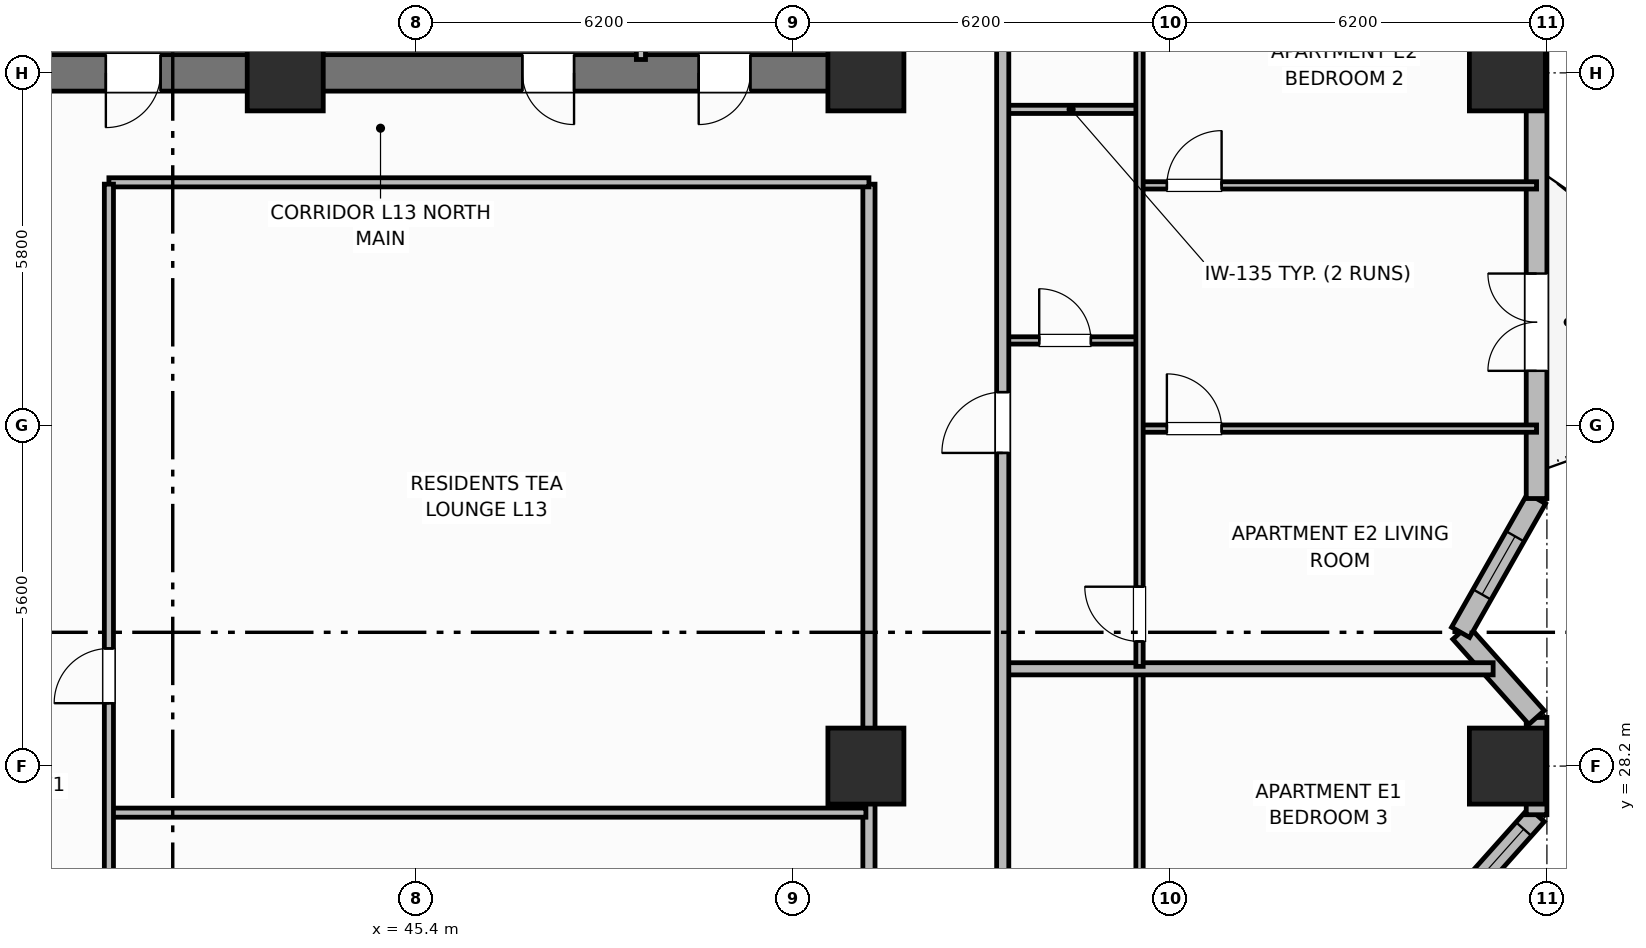
"""IFC4 building model, lengths in metres.
Left out: names, types, materials, properties, quantities, classifications, styles, units other than length and angle.
Written with IfcOpenShell. Run it as: python <this file> out.ifc"""

import sys

from ifc_helpers import new_model, si_unit, direction, frame, frame_2d, origin, origin_2d, place, context, subcontext, project, spatial, rectangle, extrude, element, fill, save


model = new_model("IFC4")
c1 = context("Model", 3, precision=1e-05, world=origin(), true_north=direction((0.0, 1.0)))
c2 = subcontext(c1, "Body", "Model", "MODEL_VIEW")
j1 = project(units=[si_unit("LENGTHUNIT", "METRE"), si_unit("PLANEANGLEUNIT", "RADIAN")], contexts=[c1])
p1 = place(None, origin())
s1 = spatial("IfcSite", under=j1, at=p1, CompositionType="ELEMENT")
p2 = place(p1, origin())
s2 = spatial("IfcBuilding", under=s1, at=p2, CompositionType="ELEMENT")
p3 = place(p2, frame((0.0, 0.0, 54.7)))
s3 = spatial("IfcBuildingStorey", under=s2, at=p3, CompositionType="ELEMENT", Elevation=54.7)
p4 = place(p3, frame((52.8, 39.9, 0.0), z_axis=(0.0, 0.0, 1.0), x_axis=(0.0, 1.0, 0.0)))
e1 = element("IfcWall", 1, at=p4, inside=s3, PredefinedType="SHEAR", context=c2, shape_type="SweptSolid", body=[
    extrude(rectangle(XDim=5.6, YDim=0.6, at=frame_2d((2.8, 0.0))), origin(), (0.0, 0.0, 1.0), 3.7),
])
p5 = place(p3, frame((52.8, 39.6, 0.0), z_axis=(0.0, 0.0, 1.0), x_axis=(-1.0, 0.0, 0.0)))
e2 = element("IfcWall", 2, at=p5, inside=s3, PredefinedType="SHEAR", context=c2, shape_type="SweptSolid", body=[
    extrude(rectangle(XDim=27.2, YDim=0.6, at=frame_2d((13.6, 0.0))), origin(), (0.0, 0.0, 1.0), 3.7),
])
p6 = place(p5, frame((24.2, 0.0, 0.0)))
e3 = element("IfcOpeningElement", 3, at=p6, cuts=e2, PredefinedType="OPENING", context=c2, shape_type="SweptSolid", body=[
    extrude(rectangle(XDim=1.1, YDim=2.15, at=frame_2d((0.55, 1.075))), frame((0.0, 0.31, 0.0), z_axis=(0.0, -1.0, 0.0), x_axis=(1.0, 0.0, 0.0)), (0.0, 0.0, 1.0), 0.62),
])
p7 = place(p5, frame((20.55, 0.0, 0.0)))
e4 = element("IfcOpeningElement", 4, at=p7, cuts=e2, PredefinedType="OPENING", context=c2, shape_type="SweptSolid", body=[
    extrude(rectangle(XDim=0.95, YDim=2.1, at=frame_2d((0.475, 1.05))), frame((0.0, 0.31, 0.0), z_axis=(0.0, -1.0, 0.0), x_axis=(1.0, 0.0, 0.0)), (0.0, 0.0, 1.0), 0.62),
])
p8 = place(p5, frame((15.1, 0.0, 0.0)))
e5 = element("IfcOpeningElement", 5, at=p8, cuts=e2, PredefinedType="OPENING", context=c2, shape_type="SweptSolid", body=[
    extrude(rectangle(XDim=1.2, YDim=2.15, at=frame_2d((0.6, 1.075))), frame((0.0, 0.31, 0.0), z_axis=(0.0, -1.0, 0.0), x_axis=(1.0, 0.0, 0.0)), (0.0, 0.0, 1.0), 0.62),
])
p9 = place(p5, frame((11.6, 0.0, 0.0)))
e6 = element("IfcOpeningElement", 6, at=p9, cuts=e2, PredefinedType="OPENING", context=c2, shape_type="SweptSolid", body=[
    extrude(rectangle(XDim=0.9, YDim=2.1, at=frame_2d((0.45, 1.05))), frame((0.0, 0.31, 0.0), z_axis=(0.0, -1.0, 0.0), x_axis=(1.0, 0.0, 0.0)), (0.0, 0.0, 1.0), 0.62),
])
p10 = place(p5, frame((4.8, 0.0, 0.0)))
e7 = element("IfcOpeningElement", 7, at=p10, cuts=e2, PredefinedType="OPENING", context=c2, shape_type="SweptSolid", body=[
    extrude(rectangle(XDim=0.85, YDim=2.1, at=frame_2d((0.425, 1.05))), frame((0.0, 0.31, 0.0), z_axis=(0.0, -1.0, 0.0), x_axis=(1.0, 0.0, 0.0)), (0.0, 0.0, 1.0), 0.62),
])
p11 = place(p5, frame((1.9, 0.0, 0.0)))
e8 = element("IfcOpeningElement", 8, at=p11, cuts=e2, PredefinedType="OPENING", context=c2, shape_type="SweptSolid", body=[
    extrude(rectangle(XDim=0.85, YDim=2.1, at=frame_2d((0.425, 1.05))), frame((0.0, 0.31, 0.0), z_axis=(0.0, -1.0, 0.0), x_axis=(1.0, 0.0, 0.0)), (0.0, 0.0, 1.0), 0.62),
])
p12 = place(p3, frame((43.25, 39.9, 0.0), z_axis=(0.0, 0.0, 1.0), x_axis=(0.0, 1.0, 0.0)))
e9 = element("IfcWall", 9, at=p12, inside=s3, PredefinedType="SHEAR", context=c2, shape_type="SweptSolid", body=[
    extrude(rectangle(XDim=5.6, YDim=0.4, at=frame_2d((2.8, 0.0))), origin(), (0.0, 0.0, 1.0), 3.7),
])
for number, where, z_axis, x_axis in (
    (10, (43.25, 39.6, 0.0), (0.0, 0.0, 1.0), (1.0, 0.0, 0.0)),
    (11, (52.8, 39.6, 0.0), (0.0, 0.0, 1.0), (1.0, 0.0, 0.0)),
    (12, (52.8, 28.2, 0.0), (0.0, 0.0, 1.0), (1.0, 0.0, 0.0)),
    (13, (63.35, 28.2, 0.0), (0.0, 0.0, 1.0), (1.0, 0.0, 0.0)),
    (14, (63.35, 39.6, 0.0), (0.0, 0.0, 1.0), (1.0, 0.0, 0.0)),
):
    element("IfcColumn", number, at=place(p3, frame(where, z_axis=z_axis, x_axis=x_axis)), inside=s3, PredefinedType="COLUMN", context=c2, shape_type="SweptSolid", body=[
        extrude(rectangle(XDim=1.25, YDim=1.25, at=origin_2d()), origin(), (0.0, 0.0, 1.0), 3.7),
    ])
p13 = place(p3, frame((62.58, 26.0, 0.0), z_axis=(0.0, 0.0, 1.0), x_axis=(0.666041619974, 0.74591457987, 0.0)))
e15 = element("IfcWall", 15, at=p13, inside=s3, PredefinedType="SOLIDWALL", context=c2, shape_type="SweptSolid", body=[
    extrude(rectangle(XDim=1.877, YDim=0.34, at=frame_2d((0.938, 0.0))), origin(), (0.0, 0.0, 1.0), 2.7),
])
p14 = place(p13, frame((0.16, 0.0, 0.69)))
e16 = element("IfcOpeningElement", 16, at=p14, cuts=e15, PredefinedType="OPENING", context=c2, shape_type="SweptSolid", body=[
    extrude(rectangle(XDim=1.4, YDim=1.85, at=frame_2d((0.7, 0.925))), frame((0.0, 0.18, 0.0), z_axis=(0.0, -1.0, 0.0), x_axis=(1.0, 0.0, 0.0)), (0.0, 0.0, 1.0), 0.36),
])
p15 = place(p3, frame((63.83, 27.4, 0.0), z_axis=(0.0, 0.0, 1.0), x_axis=(0.0, 1.0, 0.0)))
e17 = element("IfcWall", 17, at=p15, inside=s3, PredefinedType="SOLIDWALL", context=c2, shape_type="SweptSolid", body=[
    extrude(rectangle(XDim=1.6, YDim=0.34, at=frame_2d((0.8, 0.0))), origin(), (0.0, 0.0, 1.0), 2.7),
])
p16 = place(p3, frame((63.83, 29.0, 0.0), z_axis=(0.0, 0.0, 1.0), x_axis=(-0.666041619974, 0.74591457987, 0.0)))
e18 = element("IfcWall", 18, at=p16, inside=s3, PredefinedType="SOLIDWALL", context=c2, shape_type="SweptSolid", body=[
    extrude(rectangle(XDim=1.877, YDim=0.34, at=frame_2d((0.938, 0.0))), origin(), (0.0, 0.0, 1.0), 2.7),
])
p17 = place(p3, frame((62.58, 30.4, 0.0), z_axis=(0.0, 0.0, 1.0), x_axis=(0.493976255291, 0.869475393101, 0.0)))
e19 = element("IfcWall", 19, at=p17, inside=s3, PredefinedType="SOLIDWALL", context=c2, shape_type="SweptSolid", body=[
    extrude(rectangle(XDim=2.531, YDim=0.34, at=frame_2d((1.265, 0.0))), origin(), (0.0, 0.0, 1.0), 2.7),
])
p18 = place(p17, frame((0.715, 0.0, 0.89)))
e20 = element("IfcOpeningElement", 20, at=p18, cuts=e19, PredefinedType="OPENING", context=c2, shape_type="SweptSolid", body=[
    extrude(rectangle(XDim=1.1, YDim=1.65, at=frame_2d((0.55, 0.825))), frame((0.0, 0.18, 0.0), z_axis=(0.0, -1.0, 0.0), x_axis=(1.0, 0.0, 0.0)), (0.0, 0.0, 1.0), 0.36),
])
p19 = place(p3, frame((63.83, 32.6, 0.0), z_axis=(0.0, 0.0, 1.0), x_axis=(0.0, 1.0, 0.0)))
e21 = element("IfcWall", 21, at=p19, inside=s3, PredefinedType="SOLIDWALL", context=c2, shape_type="SweptSolid", body=[
    extrude(rectangle(XDim=14.8, YDim=0.34, at=frame_2d((7.4, 0.0))), origin(), (0.0, 0.0, 1.0), 2.7),
])
p20 = place(p19, frame((2.1, 0.0, 0.0)))
e22 = element("IfcOpeningElement", 22, at=p20, cuts=e21, PredefinedType="OPENING", context=c2, shape_type="SweptSolid", body=[
    extrude(rectangle(XDim=1.6, YDim=2.1, at=frame_2d((0.8, 1.05))), frame((0.0, 0.18, 0.0), z_axis=(0.0, -1.0, 0.0), x_axis=(1.0, 0.0, 0.0)), (0.0, 0.0, 1.0), 0.36),
])
p21 = place(p19, frame((7.68, 0.0, 0.89)))
e23 = element("IfcOpeningElement", 23, at=p21, cuts=e21, PredefinedType="OPENING", context=c2, shape_type="SweptSolid", body=[
    extrude(rectangle(XDim=1.1, YDim=1.65, at=frame_2d((0.55, 0.825))), frame((0.0, 0.18, 0.0), z_axis=(0.0, -1.0, 0.0), x_axis=(1.0, 0.0, 0.0)), (0.0, 0.0, 1.0), 0.36),
])
p22 = place(p19, frame((9.95, 0.0, 0.73)))
e24 = element("IfcOpeningElement", 24, at=p22, cuts=e21, PredefinedType="OPENING", context=c2, shape_type="SweptSolid", body=[
    extrude(rectangle(XDim=1.8, YDim=1.85, at=frame_2d((0.9, 0.925))), frame((0.0, 0.18, 0.0), z_axis=(0.0, -1.0, 0.0), x_axis=(1.0, 0.0, 0.0)), (0.0, 0.0, 1.0), 0.36),
])
p23 = place(p3, frame((49.1, 39.82, 0.0), z_axis=(0.0, 0.0, 1.0), x_axis=(0.0, 1.0, 0.0)))
e25 = element("IfcWall", 25, at=p23, inside=s3, PredefinedType="PARTITIONING", context=c2, shape_type="SweptSolid", body=[
    extrude(rectangle(XDim=2.73, YDim=0.15, at=frame_2d((1.365, 0.0))), origin(), (0.0, 0.0, 1.0), 2.53),
])
p24 = place(p3, frame((52.85, 18.63, 0.0), z_axis=(0.0, 0.0, 1.0), x_axis=(0.0, 1.0, 0.0)))
e26 = element("IfcWall", 26, at=p24, inside=s3, PredefinedType="PARTITIONING", context=c2, shape_type="SweptSolid", body=[
    extrude(rectangle(XDim=19.14, YDim=0.2, at=frame_2d((9.57, 0.0))), origin(), (0.0, 0.0, 1.0), 2.53),
])
p25 = place(p3, frame((40.35, 37.8, 0.0), z_axis=(0.0, 0.0, 1.0), x_axis=(1.0, 0.0, 0.0)))
e27 = element("IfcWall", 27, at=p25, inside=s3, PredefinedType="PARTITIONING", context=c2, shape_type="SweptSolid", body=[
    extrude(rectangle(XDim=12.5, YDim=0.15, at=frame_2d((6.25, 0.0))), origin(), (0.0, 0.0, 1.0), 2.53),
])
p26 = place(p3, frame((40.38, 27.434, 0.0), z_axis=(0.0, 0.0, 1.0), x_axis=(1.0, 0.0, 0.0)))
e28 = element("IfcWall", 28, at=p26, inside=s3, PredefinedType="PARTITIONING", context=c2, shape_type="SweptSolid", body=[
    extrude(rectangle(XDim=12.42, YDim=0.15, at=frame_2d((6.21, 0.0))), origin(), (0.0, 0.0, 1.0), 2.53),
])
p27 = place(p3, frame((40.35, 18.63, 0.0), z_axis=(0.0, 0.0, 1.0), x_axis=(0.0, 1.0, 0.0)))
e29 = element("IfcWall", 29, at=p27, inside=s3, PredefinedType="PARTITIONING", context=c2, shape_type="SweptSolid", body=[
    extrude(rectangle(XDim=19.14, YDim=0.15, at=frame_2d((9.57, 0.0))), origin(), (0.0, 0.0, 1.0), 2.53),
])
p28 = place(p27, frame((2.2, 0.0, 0.0)))
e30 = element("IfcOpeningElement", 30, at=p28, cuts=e29, PredefinedType="OPENING", context=c2, shape_type="SweptSolid", body=[
    extrude(rectangle(XDim=1.0, YDim=2.15, at=frame_2d((0.5, 1.075))), frame((0.0, 0.085, 0.0), z_axis=(0.0, -1.0, 0.0), x_axis=(1.0, 0.0, 0.0)), (0.0, 0.0, 1.0), 0.17),
])
p29 = place(p27, frame((10.604, 0.0, 0.0)))
e31 = element("IfcOpeningElement", 31, at=p29, cuts=e29, PredefinedType="OPENING", context=c2, shape_type="SweptSolid", body=[
    extrude(rectangle(XDim=0.9, YDim=2.1, at=frame_2d((0.45, 1.05))), frame((0.0, 0.085, 0.0), z_axis=(0.0, -1.0, 0.0), x_axis=(1.0, 0.0, 0.0)), (0.0, 0.0, 1.0), 0.17),
])
p30 = place(p3, frame((57.3, 10.64, 0.0), z_axis=(0.0, 0.0, 1.0), x_axis=(0.0, 1.0, 0.0)))
e32 = element("IfcWall", 32, at=p30, inside=s3, PredefinedType="PARTITIONING", context=c2, shape_type="SweptSolid", body=[
    extrude(rectangle(XDim=19.12, YDim=0.12, at=frame_2d((9.56, 0.0))), origin(), (0.0, 0.0, 1.0), 2.53),
])
p31 = place(p30, frame((0.41, 0.0, 0.0)))
e33 = element("IfcOpeningElement", 33, at=p31, cuts=e32, PredefinedType="OPENING", context=c2, shape_type="SweptSolid", body=[
    extrude(rectangle(XDim=0.9, YDim=2.1, at=frame_2d((0.45, 1.05))), frame((0.0, 0.07, 0.0), z_axis=(0.0, -1.0, 0.0), x_axis=(1.0, 0.0, 0.0)), (0.0, 0.0, 1.0), 0.14),
])
p32 = place(p30, frame((12.105, 0.0, 0.0)))
e34 = element("IfcOpeningElement", 34, at=p32, cuts=e32, PredefinedType="OPENING", context=c2, shape_type="SweptSolid", body=[
    extrude(rectangle(XDim=0.82, YDim=2.08, at=frame_2d((0.41, 1.04))), frame((0.0, 0.07, 0.0), z_axis=(0.0, -1.0, 0.0), x_axis=(1.0, 0.0, 0.0)), (0.0, 0.0, 1.0), 0.14),
])
p33 = place(p3, frame((55.05, 29.8, 0.0), z_axis=(0.0, 0.0, 1.0), x_axis=(1.0, 0.0, 0.0)))
e35 = element("IfcWall", 35, at=p33, inside=s3, PredefinedType="PARTITIONING", context=c2, shape_type="SweptSolid", body=[
    extrude(rectangle(XDim=8.066, YDim=0.2, at=frame_2d((4.033, 0.0))), origin(), (0.0, 0.0, 1.0), 2.53),
])
p34 = place(p3, frame((55.05, 35.2, 0.0), z_axis=(0.0, 0.0, 1.0), x_axis=(1.0, 0.0, 0.0)))
e36 = element("IfcWall", 36, at=p34, inside=s3, PredefinedType="PARTITIONING", context=c2, shape_type="SweptSolid", body=[
    extrude(rectangle(XDim=2.25, YDim=0.12, at=frame_2d((1.125, 0.0))), origin(), (0.0, 0.0, 1.0), 2.53),
])
p35 = place(p34, frame((0.6, 0.0, 0.0)))
e37 = element("IfcOpeningElement", 37, at=p35, cuts=e36, PredefinedType="OPENING", context=c2, shape_type="SweptSolid", body=[
    extrude(rectangle(XDim=0.85, YDim=2.1, at=frame_2d((0.425, 1.05))), frame((0.0, 0.07, 0.0), z_axis=(0.0, -1.0, 0.0), x_axis=(1.0, 0.0, 0.0)), (0.0, 0.0, 1.0), 0.14),
])
p36 = place(p3, frame((55.05, 39.0, 0.0), z_axis=(0.0, 0.0, 1.0), x_axis=(1.0, 0.0, 0.0)))
e38 = element("IfcWall", 38, at=p36, inside=s3, PredefinedType="PARTITIONING", context=c2, shape_type="SweptSolid", body=[
    extrude(rectangle(XDim=2.25, YDim=0.135, at=frame_2d((1.125, 0.0))), origin(), (0.0, 0.0, 1.0), 2.53),
])
p37 = place(p3, frame((57.3, 33.75, 0.0), z_axis=(0.0, 0.0, 1.0), x_axis=(1.0, 0.0, 0.0)))
e39 = element("IfcWall", 39, at=p37, inside=s3, PredefinedType="PARTITIONING", context=c2, shape_type="SweptSolid", body=[
    extrude(rectangle(XDim=6.53, YDim=0.12, at=frame_2d((3.265, 0.0))), origin(), (0.0, 0.0, 1.0), 2.53),
])
p38 = place(p37, frame((0.45, 0.0, 0.0)))
e40 = element("IfcOpeningElement", 40, at=p38, cuts=e39, PredefinedType="OPENING", context=c2, shape_type="SweptSolid", body=[
    extrude(rectangle(XDim=0.9, YDim=2.1, at=frame_2d((0.45, 1.05))), frame((0.0, 0.07, 0.0), z_axis=(0.0, -1.0, 0.0), x_axis=(1.0, 0.0, 0.0)), (0.0, 0.0, 1.0), 0.14),
])
p39 = place(p3, frame((57.3, 37.75, 0.0), z_axis=(0.0, 0.0, 1.0), x_axis=(1.0, 0.0, 0.0)))
e41 = element("IfcWall", 41, at=p39, inside=s3, PredefinedType="PARTITIONING", context=c2, shape_type="SweptSolid", body=[
    extrude(rectangle(XDim=6.53, YDim=0.12, at=frame_2d((3.265, 0.0))), origin(), (0.0, 0.0, 1.0), 2.53),
])
p40 = place(p39, frame((0.45, 0.0, 0.0)))
e42 = element("IfcOpeningElement", 42, at=p40, cuts=e41, PredefinedType="OPENING", context=c2, shape_type="SweptSolid", body=[
    extrude(rectangle(XDim=0.9, YDim=2.1, at=frame_2d((0.45, 1.05))), frame((0.0, 0.07, 0.0), z_axis=(0.0, -1.0, 0.0), x_axis=(1.0, 0.0, 0.0)), (0.0, 0.0, 1.0), 0.14),
])
p41 = place(p3, frame((57.3, 29.84, 0.0), z_axis=(0.0, 0.0, 1.0), x_axis=(0.0, 1.0, 0.0)))
e43 = element("IfcWall", 43, at=p41, inside=s3, PredefinedType="PARTITIONING", context=c2, shape_type="SweptSolid", body=[
    extrude(rectangle(XDim=15.92, YDim=0.12, at=frame_2d((7.96, 0.0))), origin(), (0.0, 0.0, 1.0), 2.53),
])
p42 = place(p41, frame((0.41, 0.0, 0.0)))
e44 = element("IfcOpeningElement", 44, at=p42, cuts=e43, PredefinedType="OPENING", context=c2, shape_type="SweptSolid", body=[
    extrude(rectangle(XDim=0.9, YDim=2.1, at=frame_2d((0.45, 1.05))), frame((0.0, 0.07, 0.0), z_axis=(0.0, -1.0, 0.0), x_axis=(1.0, 0.0, 0.0)), (0.0, 0.0, 1.0), 0.14),
])
p43 = place(p41, frame((13.125, 0.0, 0.0)))
e45 = element("IfcOpeningElement", 45, at=p43, cuts=e43, PredefinedType="OPENING", context=c2, shape_type="SweptSolid", body=[
    extrude(rectangle(XDim=0.82, YDim=2.08, at=frame_2d((0.41, 1.04))), frame((0.0, 0.07, 0.0), z_axis=(0.0, -1.0, 0.0), x_axis=(1.0, 0.0, 0.0)), (0.0, 0.0, 1.0), 0.14),
])
p44 = place(p3, frame((55.05, 10.6, 0.0), z_axis=(0.0, 0.0, 1.0), x_axis=(0.0, 1.0, 0.0)))
e46 = element("IfcWall", 46, at=p44, inside=s3, PredefinedType="PARTITIONING", context=c2, shape_type="SweptSolid", body=[
    extrude(rectangle(XDim=35.2, YDim=0.2, at=frame_2d((17.6, 0.0))), origin(), (0.0, 0.0, 1.0), 2.53),
])
p45 = place(p44, frame((2.65, 0.0, 0.0)))
e47 = element("IfcOpeningElement", 47, at=p45, cuts=e46, PredefinedType="OPENING", context=c2, shape_type="SweptSolid", body=[
    extrude(rectangle(XDim=1.0, YDim=2.15, at=frame_2d((0.5, 1.075))), frame((0.0, 0.11, 0.0), z_axis=(0.0, -1.0, 0.0), x_axis=(1.0, 0.0, 0.0)), (0.0, 0.0, 1.0), 0.22),
])
p46 = place(p44, frame((22.75, 0.0, 0.0)))
e48 = element("IfcOpeningElement", 48, at=p46, cuts=e46, PredefinedType="OPENING", context=c2, shape_type="SweptSolid", body=[
    extrude(rectangle(XDim=1.0, YDim=2.15, at=frame_2d((0.5, 1.075))), frame((0.0, 0.11, 0.0), z_axis=(0.0, -1.0, 0.0), x_axis=(1.0, 0.0, 0.0)), (0.0, 0.0, 1.0), 0.22),
])
p47 = place(p14, origin())
e49 = element("IfcWindow", 49, at=p47, inside=s3, PartitioningType="SINGLE_PANEL", PredefinedType="WINDOW", context=c2, shape_type="SweptSolid", body=[
    extrude(rectangle(XDim=1.4, YDim=1.85, at=frame_2d((0.7, 0.925))), frame((0.0, 0.03, 0.0), z_axis=(0.0, -1.0, 0.0), x_axis=(1.0, 0.0, 0.0)), (0.0, 0.0, 1.0), 0.06),
])
fill(e16, e49)
p48 = place(p18, origin())
e50 = element("IfcWindow", 50, at=p48, inside=s3, PartitioningType="SINGLE_PANEL", PredefinedType="WINDOW", context=c2, shape_type="SweptSolid", body=[
    extrude(rectangle(XDim=1.1, YDim=1.65, at=frame_2d((0.55, 0.825))), frame((0.0, 0.03, 0.0), z_axis=(0.0, -1.0, 0.0), x_axis=(1.0, 0.0, 0.0)), (0.0, 0.0, 1.0), 0.06),
])
fill(e20, e50)
p49 = place(p20, origin())
e51 = element("IfcDoor", 51, at=p49, inside=s3, OperationType="DOUBLE_DOOR_SINGLE_SWING", PredefinedType="DOOR", context=c2, shape_type="SweptSolid", body=[
    extrude(rectangle(XDim=1.6, YDim=2.1, at=frame_2d((0.8, 1.05))), frame((0.0, 0.025, 0.0), z_axis=(0.0, -1.0, 0.0), x_axis=(1.0, 0.0, 0.0)), (0.0, 0.0, 1.0), 0.05),
])
fill(e22, e51)
p50 = place(p29, origin())
e52 = element("IfcDoor", 52, at=p50, inside=s3, OperationType="SINGLE_SWING_LEFT", PredefinedType="DOOR", context=c2, shape_type="SweptSolid", body=[
    extrude(rectangle(XDim=0.9, YDim=2.1, at=frame_2d((0.45, 1.05))), frame((0.0, 0.025, 0.0), z_axis=(0.0, -1.0, 0.0), x_axis=(1.0, 0.0, 0.0)), (0.0, 0.0, 1.0), 0.05),
])
fill(e31, e52)
p51 = place(p35, origin())
e53 = element("IfcDoor", 53, at=p51, inside=s3, OperationType="SINGLE_SWING_LEFT", PredefinedType="DOOR", context=c2, shape_type="SweptSolid", body=[
    extrude(rectangle(XDim=0.85, YDim=2.1, at=frame_2d((0.425, 1.05))), frame((0.0, 0.025, 0.0), z_axis=(0.0, -1.0, 0.0), x_axis=(1.0, 0.0, 0.0)), (0.0, 0.0, 1.0), 0.05),
])
fill(e37, e53)
p52 = place(p38, origin())
e54 = element("IfcDoor", 54, at=p52, inside=s3, OperationType="SINGLE_SWING_LEFT", PredefinedType="DOOR", context=c2, shape_type="SweptSolid", body=[
    extrude(rectangle(XDim=0.9, YDim=2.1, at=frame_2d((0.45, 1.05))), frame((0.0, 0.025, 0.0), z_axis=(0.0, -1.0, 0.0), x_axis=(1.0, 0.0, 0.0)), (0.0, 0.0, 1.0), 0.05),
])
fill(e40, e54)
p53 = place(p40, origin())
e55 = element("IfcDoor", 55, at=p53, inside=s3, OperationType="SINGLE_SWING_RIGHT", PredefinedType="DOOR", context=c2, shape_type="SweptSolid", body=[
    extrude(rectangle(XDim=0.9, YDim=2.1, at=frame_2d((0.45, 1.05))), frame((0.0, 0.025, 0.0), z_axis=(0.0, -1.0, 0.0), x_axis=(1.0, 0.0, 0.0)), (0.0, 0.0, 1.0), 0.05),
])
fill(e42, e55)
p54 = place(p42, origin())
e56 = element("IfcDoor", 56, at=p54, inside=s3, OperationType="SINGLE_SWING_RIGHT", PredefinedType="DOOR", context=c2, shape_type="SweptSolid", body=[
    extrude(rectangle(XDim=0.9, YDim=2.1, at=frame_2d((0.45, 1.05))), frame((0.0, 0.025, 0.0), z_axis=(0.0, -1.0, 0.0), x_axis=(1.0, 0.0, 0.0)), (0.0, 0.0, 1.0), 0.05),
])
fill(e44, e56)
p55 = place(p46, origin())
e57 = element("IfcDoor", 57, at=p55, inside=s3, OperationType="SINGLE_SWING_LEFT", PredefinedType="DOOR", context=c2, shape_type="SweptSolid", body=[
    extrude(rectangle(XDim=1.0, YDim=2.15, at=frame_2d((0.5, 1.075))), frame((0.0, 0.025, 0.0), z_axis=(0.0, -1.0, 0.0), x_axis=(1.0, 0.0, 0.0)), (0.0, 0.0, 1.0), 0.05),
])
fill(e48, e57)
p56 = place(p9, origin())
e58 = element("IfcDoor", 58, at=p56, inside=s3, OperationType="SINGLE_SWING_RIGHT", PredefinedType="DOOR", context=c2, shape_type="SweptSolid", body=[
    extrude(rectangle(XDim=0.9, YDim=2.1, at=frame_2d((0.45, 1.05))), frame((0.0, 0.025, 0.0), z_axis=(0.0, -1.0, 0.0), x_axis=(1.0, 0.0, 0.0)), (0.0, 0.0, 1.0), 0.05),
])
fill(e6, e58)
p57 = place(p10, origin())
e59 = element("IfcDoor", 59, at=p57, inside=s3, OperationType="SINGLE_SWING_LEFT", PredefinedType="DOOR", context=c2, shape_type="SweptSolid", body=[
    extrude(rectangle(XDim=0.85, YDim=2.1, at=frame_2d((0.425, 1.05))), frame((0.0, 0.025, 0.0), z_axis=(0.0, -1.0, 0.0), x_axis=(1.0, 0.0, 0.0)), (0.0, 0.0, 1.0), 0.05),
])
fill(e7, e59)
p58 = place(p11, origin())
e60 = element("IfcDoor", 60, at=p58, inside=s3, OperationType="SINGLE_SWING_RIGHT", PredefinedType="DOOR", context=c2, shape_type="SweptSolid", body=[
    extrude(rectangle(XDim=0.85, YDim=2.1, at=frame_2d((0.425, 1.05))), frame((0.0, 0.025, 0.0), z_axis=(0.0, -1.0, 0.0), x_axis=(1.0, 0.0, 0.0)), (0.0, 0.0, 1.0), 0.05),
])
fill(e8, e60)
save(model, sys.argv[1])
